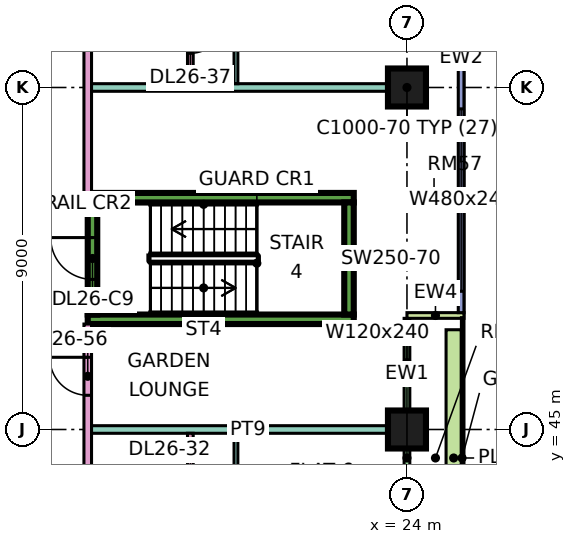
"""IFC4 building model, lengths in metres.
Left out: names, types, materials, properties, quantities, classifications, styles, units other than length and angle.
Written with IfcOpenShell. Run it as: python <this file> out.ifc"""

import sys

from ifc_helpers import new_model, si_unit, direction, frame, frame_2d, origin, origin_2d, place, context, subcontext, project, spatial, rectangle, extrude, element, fill, save


model = new_model("IFC4")
c1 = context("Model", 3, precision=1e-05, world=origin(), true_north=direction((0.0, 1.0)))
c2 = subcontext(c1, "Body", "Model", "MODEL_VIEW")
j1 = project(units=[si_unit("LENGTHUNIT", "METRE"), si_unit("PLANEANGLEUNIT", "RADIAN")], contexts=[c1])
p1 = place(None, origin())
s1 = spatial("IfcSite", under=j1, at=p1, CompositionType="ELEMENT")
p2 = place(p1, origin())
s2 = spatial("IfcBuilding", under=s1, at=p2, CompositionType="ELEMENT")
p3 = place(p2, frame((0.0, 0.0, 114.4)))
s3 = spatial("IfcBuildingStorey", under=s2, at=p3, CompositionType="ELEMENT", Elevation=114.4)
for number, where, z_axis, x_axis in (
    (1, (24.0, 45.0, 0.0), (0.0, 0.0, 1.0), (1.0, 0.0, 0.0)),
    (2, (24.0, 54.0, 0.0), (0.0, 0.0, 1.0), (1.0, 0.0, 0.0)),
):
    element("IfcColumn", number, at=place(p3, frame(where, z_axis=z_axis, x_axis=x_axis)), inside=s3, PredefinedType="COLUMN", context=c2, shape_type="SweptSolid", body=[
        extrude(rectangle(XDim=1.0, YDim=1.0, at=origin_2d()), origin(), (0.0, 0.0, 1.0), 3.75),
    ])
for number, where, z_axis, x_axis in (
    (3, (15.6, 47.9, 0.0), (0.0, 0.0, 1.0), (1.0, 0.0, 0.0)),
    (4, (15.6, 51.1, 0.0), (0.0, 0.0, 1.0), (1.0, 0.0, 0.0)),
):
    element("IfcWall", number, at=place(p3, frame(where, z_axis=z_axis, x_axis=x_axis)), inside=s3, PredefinedType="SHEAR", context=c2, shape_type="SweptSolid", body=[
        extrude(rectangle(XDim=7.0, YDim=0.25, at=frame_2d((3.5, 0.0))), origin(), (0.0, 0.0, 1.0), 3.75),
    ])
p4 = place(p3, frame((15.725, 48.025, 0.0), z_axis=(0.0, 0.0, 1.0), x_axis=(0.0, 1.0, 0.0)))
e5 = element("IfcWall", 5, at=p4, inside=s3, PredefinedType="SHEAR", context=c2, shape_type="SweptSolid", body=[
    extrude(rectangle(XDim=2.95, YDim=0.25, at=frame_2d((1.475, 0.0))), origin(), (0.0, 0.0, 1.0), 3.75),
])
p5 = place(p4, frame((0.925, 0.0, 0.0)))
e6 = element("IfcOpeningElement", 6, at=p5, cuts=e5, PredefinedType="OPENING", context=c2, shape_type="SweptSolid", body=[
    extrude(rectangle(XDim=1.1, YDim=2.2, at=frame_2d((0.55, 1.1))), frame((0.0, 0.135, 0.0), z_axis=(0.0, -1.0, 0.0), x_axis=(1.0, 0.0, 0.0)), (0.0, 0.0, 1.0), 0.27),
])
p6 = place(p3, frame((22.475, 48.025, 0.0), z_axis=(0.0, 0.0, 1.0), x_axis=(0.0, 1.0, 0.0)))
e7 = element("IfcWall", 7, at=p6, inside=s3, PredefinedType="SHEAR", context=c2, shape_type="SweptSolid", body=[
    extrude(rectangle(XDim=2.95, YDim=0.25, at=frame_2d((1.475, 0.0))), origin(), (0.0, 0.0, 1.0), 3.75),
])
p7 = place(p3, frame((24.0, 40.575, 0.0), z_axis=(0.0, 0.0, 1.0), x_axis=(0.0, 1.0, 0.0)))
e8 = element("IfcWall", 8, at=p7, inside=s3, PredefinedType="SOLIDWALL", context=c2, shape_type="SweptSolid", body=[
    extrude(rectangle(XDim=7.35, YDim=0.15, at=frame_2d((3.675, 0.0))), origin(), (0.0, 0.0, 1.0), 3.35),
])
p8 = place(p7, frame((0.262, 0.0, 0.45)))
e9 = element("IfcOpeningElement", 9, at=p8, cuts=e8, PredefinedType="OPENING", context=c2, shape_type="SweptSolid", body=[
    extrude(rectangle(XDim=0.9, YDim=2.4, at=frame_2d((0.45, 1.2))), frame((0.0, 0.085, 0.0), z_axis=(0.0, -1.0, 0.0), x_axis=(1.0, 0.0, 0.0)), (0.0, 0.0, 1.0), 0.17),
])
p9 = place(p7, frame((2.025, 0.0, 0.0)))
e10 = element("IfcOpeningElement", 10, at=p9, cuts=e8, PredefinedType="OPENING", context=c2, shape_type="SweptSolid", body=[
    extrude(rectangle(XDim=1.2, YDim=2.4, at=frame_2d((0.6, 1.2))), frame((0.0, 0.085, 0.0), z_axis=(0.0, -1.0, 0.0), x_axis=(1.0, 0.0, 0.0)), (0.0, 0.0, 1.0), 0.17),
])
p10 = place(p7, frame((5.587, 0.0, 0.45)))
e11 = element("IfcOpeningElement", 11, at=p10, cuts=e8, PredefinedType="OPENING", context=c2, shape_type="SweptSolid", body=[
    extrude(rectangle(XDim=1.2, YDim=2.4, at=frame_2d((0.6, 1.2))), frame((0.0, 0.085, 0.0), z_axis=(0.0, -1.0, 0.0), x_axis=(1.0, 0.0, 0.0)), (0.0, 0.0, 1.0), 0.17),
])
p11 = place(p3, frame((25.5, 48.0, 0.0), z_axis=(0.0, 0.0, 1.0), x_axis=(-1.0, 0.0, 0.0)))
e12 = element("IfcWall", 12, at=p11, inside=s3, PredefinedType="SOLIDWALL", context=c2, shape_type="SweptSolid", body=[
    extrude(rectangle(XDim=1.5, YDim=0.15, at=frame_2d((0.75, 0.0))), origin(), (0.0, 0.0, 1.0), 3.35),
])
p12 = place(p3, frame((25.425, 48.075, 0.0), z_axis=(0.0, 0.0, 1.0), x_axis=(0.0, 1.0, 0.0)))
e13 = element("IfcWall", 13, at=p12, inside=s3, PredefinedType="SOLIDWALL", context=c2, shape_type="SweptSolid", body=[
    extrude(rectangle(XDim=13.425, YDim=0.15, at=frame_2d((6.712, 0.0))), origin(), (0.0, 0.0, 1.0), 3.35),
])
p13 = place(p12, frame((0.562, 0.0, 0.45)))
e14 = element("IfcOpeningElement", 14, at=p13, cuts=e13, PredefinedType="OPENING", context=c2, shape_type="SweptSolid", body=[
    extrude(rectangle(XDim=4.8, YDim=2.4, at=frame_2d((2.4, 1.2))), frame((0.0, 0.085, 0.0), z_axis=(0.0, -1.0, 0.0), x_axis=(1.0, 0.0, 0.0)), (0.0, 0.0, 1.0), 0.17),
])
p14 = place(p12, frame((6.525, 0.0, 0.45)))
e15 = element("IfcOpeningElement", 15, at=p14, cuts=e13, PredefinedType="OPENING", context=c2, shape_type="SweptSolid", body=[
    extrude(rectangle(XDim=1.8, YDim=2.4, at=frame_2d((0.9, 1.2))), frame((0.0, 0.085, 0.0), z_axis=(0.0, -1.0, 0.0), x_axis=(1.0, 0.0, 0.0)), (0.0, 0.0, 1.0), 0.17),
])
p15 = place(p12, frame((9.525, 0.0, 0.45)))
e16 = element("IfcOpeningElement", 16, at=p15, cuts=e13, PredefinedType="OPENING", context=c2, shape_type="SweptSolid", body=[
    extrude(rectangle(XDim=1.8, YDim=2.4, at=frame_2d((0.9, 1.2))), frame((0.0, 0.085, 0.0), z_axis=(0.0, -1.0, 0.0), x_axis=(1.0, 0.0, 0.0)), (0.0, 0.0, 1.0), 0.17),
])
p16 = place(p12, frame((12.225, 0.0, 0.45)))
e17 = element("IfcOpeningElement", 17, at=p16, cuts=e13, PredefinedType="OPENING", context=c2, shape_type="SweptSolid", body=[
    extrude(rectangle(XDim=0.9, YDim=2.4, at=frame_2d((0.45, 1.2))), frame((0.0, 0.085, 0.0), z_axis=(0.0, -1.0, 0.0), x_axis=(1.0, 0.0, 0.0)), (0.0, 0.0, 1.0), 0.17),
])
p17 = place(p3, frame((25.229, 40.875, 0.0), z_axis=(0.0, 0.0, 1.0), x_axis=(0.0, 1.0, 0.0)))
e18 = element("IfcWall", 18, at=p17, inside=s3, PredefinedType="SOLIDWALL", context=c2, shape_type="SweptSolid", body=[
    extrude(rectangle(XDim=6.75, YDim=0.4, at=frame_2d((3.375, 0.0))), origin(), (0.0, 0.0, 1.0), 0.7),
])
p18 = place(p3, frame((15.6, 20.0, 0.0), z_axis=(0.0, 0.0, 1.0), x_axis=(0.0, 1.0, 0.0)))
e19 = element("IfcWall", 19, at=p18, inside=s3, PredefinedType="PARTITIONING", context=c2, shape_type="SweptSolid", body=[
    extrude(rectangle(XDim=27.775, YDim=0.2, at=frame_2d((13.887, 0.0))), origin(), (0.0, 0.0, 1.0), 3.35),
])
p19 = place(p18, frame((7.15, 0.0, 0.0)))
e20 = element("IfcOpeningElement", 20, at=p19, cuts=e19, PredefinedType="OPENING", context=c2, shape_type="SweptSolid", body=[
    extrude(rectangle(XDim=1.6, YDim=2.1, at=frame_2d((0.8, 1.05))), frame((0.0, 0.11, 0.0), z_axis=(0.0, -1.0, 0.0), x_axis=(1.0, 0.0, 0.0)), (0.0, 0.0, 1.0), 0.22),
])
p20 = place(p18, frame((13.5, 0.0, 0.0)))
e21 = element("IfcOpeningElement", 21, at=p20, cuts=e19, PredefinedType="OPENING", context=c2, shape_type="SweptSolid", body=[
    extrude(rectangle(XDim=1.0, YDim=2.1, at=frame_2d((0.5, 1.05))), frame((0.0, 0.11, 0.0), z_axis=(0.0, -1.0, 0.0), x_axis=(1.0, 0.0, 0.0)), (0.0, 0.0, 1.0), 0.22),
])
p21 = place(p18, frame((17.2, 0.0, 0.0)))
e22 = element("IfcOpeningElement", 22, at=p21, cuts=e19, PredefinedType="OPENING", context=c2, shape_type="SweptSolid", body=[
    extrude(rectangle(XDim=1.0, YDim=2.1, at=frame_2d((0.5, 1.05))), frame((0.0, 0.11, 0.0), z_axis=(0.0, -1.0, 0.0), x_axis=(1.0, 0.0, 0.0)), (0.0, 0.0, 1.0), 0.22),
])
p22 = place(p18, frame((1.15, 0.0, 0.0)))
e23 = element("IfcOpeningElement", 23, at=p22, cuts=e19, PredefinedType="OPENING", context=c2, shape_type="SweptSolid", body=[
    extrude(rectangle(XDim=1.8, YDim=2.1, at=frame_2d((0.9, 1.05))), frame((0.0, 0.11, 0.0), z_axis=(0.0, -1.0, 0.0), x_axis=(1.0, 0.0, 0.0)), (0.0, 0.0, 1.0), 0.22),
])
p23 = place(p18, frame((25.9, 0.0, 0.0)))
e24 = element("IfcOpeningElement", 24, at=p23, cuts=e19, PredefinedType="OPENING", context=c2, shape_type="SweptSolid", body=[
    extrude(rectangle(XDim=1.0, YDim=2.1, at=frame_2d((0.5, 1.05))), frame((0.0, 0.11, 0.0), z_axis=(0.0, -1.0, 0.0), x_axis=(1.0, 0.0, 0.0)), (0.0, 0.0, 1.0), 0.22),
])
p24 = place(p3, frame((15.6, 51.225, 0.0), z_axis=(0.0, 0.0, 1.0), x_axis=(0.0, 1.0, 0.0)))
e25 = element("IfcWall", 25, at=p24, inside=s3, PredefinedType="PARTITIONING", context=c2, shape_type="SweptSolid", body=[
    extrude(rectangle(XDim=11.701, YDim=0.2, at=frame_2d((5.851, 0.0))), origin(), (0.0, 0.0, 1.0), 3.35),
])
p25 = place(p24, frame((9.975, 0.0, 0.0)))
e26 = element("IfcOpeningElement", 26, at=p25, cuts=e25, PredefinedType="OPENING", context=c2, shape_type="SweptSolid", body=[
    extrude(rectangle(XDim=1.0, YDim=2.1, at=frame_2d((0.5, 1.05))), frame((0.0, 0.11, 0.0), z_axis=(0.0, -1.0, 0.0), x_axis=(1.0, 0.0, 0.0)), (0.0, 0.0, 1.0), 0.22),
])
p26 = place(p3, frame((15.7, 45.0, 0.0), z_axis=(0.0, 0.0, 1.0), x_axis=(1.0, 0.0, 0.0)))
e27 = element("IfcWall", 27, at=p26, inside=s3, PredefinedType="PARTITIONING", context=c2, shape_type="SweptSolid", body=[
    extrude(rectangle(XDim=8.226, YDim=0.2, at=frame_2d((4.113, 0.0))), origin(), (0.0, 0.0, 1.0), 3.35),
])
p27 = place(p3, frame((15.7, 54.0, 0.0), z_axis=(0.0, 0.0, 1.0), x_axis=(1.0, 0.0, 0.0)))
e28 = element("IfcWall", 28, at=p27, inside=s3, PredefinedType="PARTITIONING", context=c2, shape_type="SweptSolid", body=[
    extrude(rectangle(XDim=8.3, YDim=0.2, at=frame_2d((4.15, 0.0))), origin(), (0.0, 0.0, 1.0), 3.35),
])
p28 = place(p3, frame((18.3, 39.225, 0.0), z_axis=(0.0, 0.0, 1.0), x_axis=(0.0, 1.0, 0.0)))
e29 = element("IfcWall", 29, at=p28, inside=s3, PredefinedType="PARTITIONING", context=c2, shape_type="SweptSolid", body=[
    extrude(rectangle(XDim=5.675, YDim=0.15, at=frame_2d((2.837, 0.0))), origin(), (0.0, 0.0, 1.0), 3.35),
])
p29 = place(p28, frame((3.825, 0.0, 0.0)))
e30 = element("IfcOpeningElement", 30, at=p29, cuts=e29, PredefinedType="OPENING", context=c2, shape_type="SweptSolid", body=[
    extrude(rectangle(XDim=0.9, YDim=2.1, at=frame_2d((0.45, 1.05))), frame((0.0, 0.085, 0.0), z_axis=(0.0, -1.0, 0.0), x_axis=(1.0, 0.0, 0.0)), (0.0, 0.0, 1.0), 0.17),
])
p30 = place(p3, frame((18.3, 54.1, 0.0), z_axis=(0.0, 0.0, 1.0), x_axis=(0.0, 1.0, 0.0)))
e31 = element("IfcWall", 31, at=p30, inside=s3, PredefinedType="PARTITIONING", context=c2, shape_type="SweptSolid", body=[
    extrude(rectangle(XDim=6.275, YDim=0.15, at=frame_2d((3.137, 0.0))), origin(), (0.0, 0.0, 1.0), 3.35),
])
p31 = place(p30, frame((4.05, 0.0, 0.0)))
e32 = element("IfcOpeningElement", 32, at=p31, cuts=e31, PredefinedType="OPENING", context=c2, shape_type="SweptSolid", body=[
    extrude(rectangle(XDim=0.8, YDim=2.1, at=frame_2d((0.4, 1.05))), frame((0.0, 0.085, 0.0), z_axis=(0.0, -1.0, 0.0), x_axis=(1.0, 0.0, 0.0)), (0.0, 0.0, 1.0), 0.17),
])
p32 = place(p30, frame((0.8, 0.0, 0.0)))
e33 = element("IfcOpeningElement", 33, at=p32, cuts=e31, PredefinedType="OPENING", context=c2, shape_type="SweptSolid", body=[
    extrude(rectangle(XDim=0.9, YDim=2.1, at=frame_2d((0.45, 1.05))), frame((0.0, 0.085, 0.0), z_axis=(0.0, -1.0, 0.0), x_axis=(1.0, 0.0, 0.0)), (0.0, 0.0, 1.0), 0.17),
])
p33 = place(p3, frame((19.5, 38.95, 0.0), z_axis=(0.0, 0.0, 1.0), x_axis=(0.0, 1.0, 0.0)))
e34 = element("IfcWall", 34, at=p33, inside=s3, PredefinedType="PARTITIONING", context=c2, shape_type="SweptSolid", body=[
    extrude(rectangle(XDim=5.95, YDim=0.1, at=frame_2d((2.975, 0.0))), origin(), (0.0, 0.0, 1.0), 3.35),
])
p34 = place(p33, frame((1.1, 0.0, 0.0)))
e35 = element("IfcOpeningElement", 35, at=p34, cuts=e34, PredefinedType="OPENING", context=c2, shape_type="SweptSolid", body=[
    extrude(rectangle(XDim=0.9, YDim=2.1, at=frame_2d((0.45, 1.05))), frame((0.0, 0.06, 0.0), z_axis=(0.0, -1.0, 0.0), x_axis=(1.0, 0.0, 0.0)), (0.0, 0.0, 1.0), 0.12),
])
p35 = place(p33, frame((4.1, 0.0, 0.0)))
e36 = element("IfcOpeningElement", 36, at=p35, cuts=e34, PredefinedType="OPENING", context=c2, shape_type="SweptSolid", body=[
    extrude(rectangle(XDim=0.9, YDim=2.1, at=frame_2d((0.45, 1.05))), frame((0.0, 0.06, 0.0), z_axis=(0.0, -1.0, 0.0), x_axis=(1.0, 0.0, 0.0)), (0.0, 0.0, 1.0), 0.12),
])
p36 = place(p3, frame((19.5, 54.1, 0.0), z_axis=(0.0, 0.0, 1.0), x_axis=(0.0, 1.0, 0.0)))
e37 = element("IfcWall", 37, at=p36, inside=s3, PredefinedType="PARTITIONING", context=c2, shape_type="SweptSolid", body=[
    extrude(rectangle(XDim=2.85, YDim=0.1, at=frame_2d((1.425, 0.0))), origin(), (0.0, 0.0, 1.0), 3.35),
])
p37 = place(p36, frame((0.95, 0.0, 0.0)))
e38 = element("IfcOpeningElement", 38, at=p37, cuts=e37, PredefinedType="OPENING", context=c2, shape_type="SweptSolid", body=[
    extrude(rectangle(XDim=0.9, YDim=2.1, at=frame_2d((0.45, 1.05))), frame((0.0, 0.06, 0.0), z_axis=(0.0, -1.0, 0.0), x_axis=(1.0, 0.0, 0.0)), (0.0, 0.0, 1.0), 0.12),
])
p38 = place(p10, origin())
e39 = element("IfcWindow", 39, at=p38, inside=s3, PartitioningType="SINGLE_PANEL", PredefinedType="WINDOW", context=c2, shape_type="SweptSolid", body=[
    extrude(rectangle(XDim=1.2, YDim=2.4, at=frame_2d((0.6, 1.2))), frame((0.0, 0.03, 0.0), z_axis=(0.0, -1.0, 0.0), x_axis=(1.0, 0.0, 0.0)), (0.0, 0.0, 1.0), 0.06),
])
fill(e11, e39)
p39 = place(p13, origin())
e40 = element("IfcWindow", 40, at=p39, inside=s3, PartitioningType="SINGLE_PANEL", PredefinedType="WINDOW", context=c2, shape_type="SweptSolid", body=[
    extrude(rectangle(XDim=4.8, YDim=2.4, at=frame_2d((2.4, 1.2))), frame((0.0, 0.03, 0.0), z_axis=(0.0, -1.0, 0.0), x_axis=(1.0, 0.0, 0.0)), (0.0, 0.0, 1.0), 0.06),
])
fill(e14, e40)
p40 = place(p14, origin())
e41 = element("IfcWindow", 41, at=p40, inside=s3, PartitioningType="SINGLE_PANEL", PredefinedType="WINDOW", context=c2, shape_type="SweptSolid", body=[
    extrude(rectangle(XDim=1.8, YDim=2.4, at=frame_2d((0.9, 1.2))), frame((0.0, 0.03, 0.0), z_axis=(0.0, -1.0, 0.0), x_axis=(1.0, 0.0, 0.0)), (0.0, 0.0, 1.0), 0.06),
])
fill(e15, e41)
p41 = place(p5, frame((1.1, 0.0, 0.0), z_axis=(0.0, 0.0, 1.0), x_axis=(-1.0, 0.0, 0.0)))
e42 = element("IfcDoor", 42, at=p41, inside=s3, OperationType="SINGLE_SWING_RIGHT", PredefinedType="DOOR", context=c2, shape_type="SweptSolid", body=[
    extrude(rectangle(XDim=1.1, YDim=2.2, at=frame_2d((0.55, 1.1))), frame((0.0, 0.025, 0.0), z_axis=(0.0, -1.0, 0.0), x_axis=(1.0, 0.0, 0.0)), (0.0, 0.0, 1.0), 0.05),
])
fill(e6, e42)
p42 = place(p32, origin())
e43 = element("IfcDoor", 43, at=p42, inside=s3, OperationType="SINGLE_SWING_RIGHT", PredefinedType="DOOR", context=c2, shape_type="SweptSolid", body=[
    extrude(rectangle(XDim=0.9, YDim=2.1, at=frame_2d((0.45, 1.05))), frame((0.0, 0.025, 0.0), z_axis=(0.0, -1.0, 0.0), x_axis=(1.0, 0.0, 0.0)), (0.0, 0.0, 1.0), 0.05),
])
fill(e33, e43)
p43 = place(p23, frame((1.0, 0.0, 0.0), z_axis=(0.0, 0.0, 1.0), x_axis=(-1.0, 0.0, 0.0)))
e44 = element("IfcDoor", 44, at=p43, inside=s3, OperationType="SINGLE_SWING_RIGHT", PredefinedType="DOOR", context=c2, shape_type="SweptSolid", body=[
    extrude(rectangle(XDim=1.0, YDim=2.1, at=frame_2d((0.5, 1.05))), frame((0.0, 0.025, 0.0), z_axis=(0.0, -1.0, 0.0), x_axis=(1.0, 0.0, 0.0)), (0.0, 0.0, 1.0), 0.05),
])
fill(e24, e44)
save(model, sys.argv[1])
